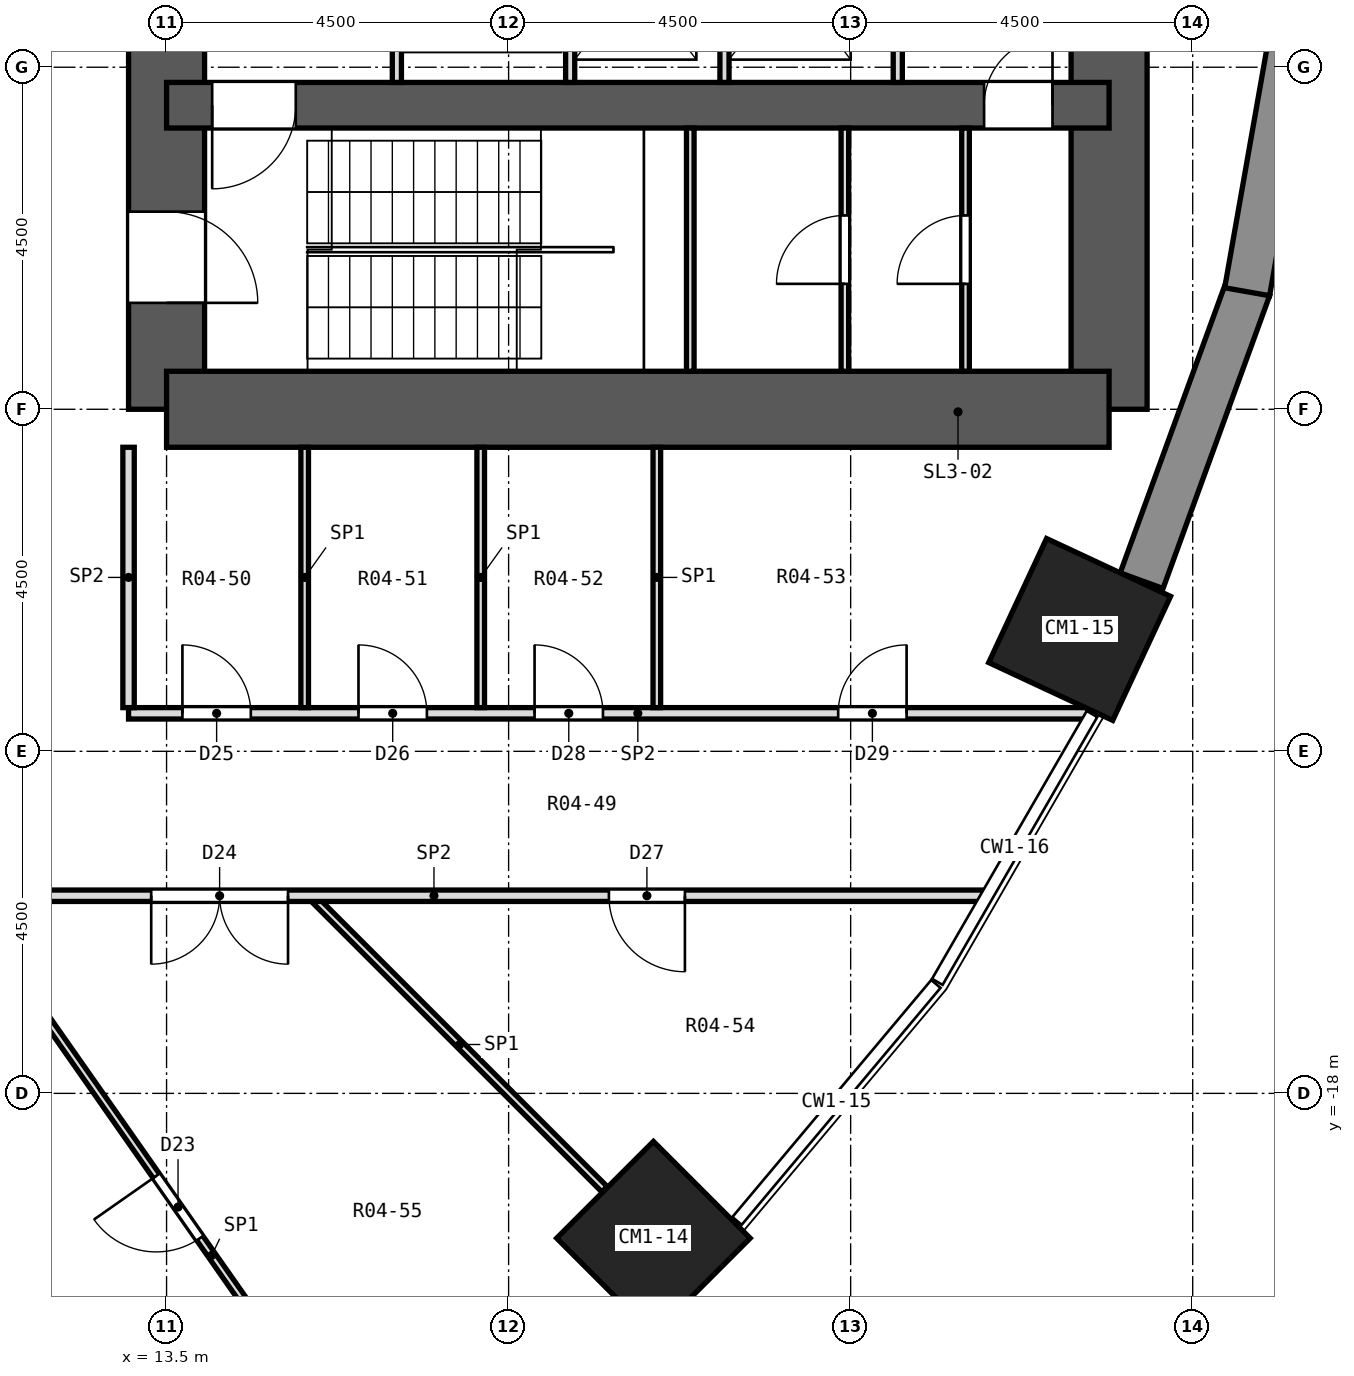
"""IFC4 building model, lengths in metres.
Left out: names, types, materials, properties, quantities, classifications, styles, units other than length and angle.
Written with IfcOpenShell. Run it as: python <this file> out.ifc"""

import sys

from ifc_helpers import new_model, si_unit, direction, frame, frame_2d, origin, origin_2d, place, context, subcontext, project, spatial, rectangle, extrude, element, fill, save


model = new_model("IFC4")
c1 = context("Model", 3, precision=1e-05, world=origin(), true_north=direction((0.0, 1.0)))
c2 = subcontext(c1, "Body", "Model", "MODEL_VIEW")
j1 = project(units=[si_unit("LENGTHUNIT", "METRE"), si_unit("PLANEANGLEUNIT", "RADIAN")], contexts=[c1])
p1 = place(None, origin())
s1 = spatial("IfcSite", under=j1, at=p1, CompositionType="ELEMENT")
p2 = place(p1, origin())
s2 = spatial("IfcBuilding", under=s1, at=p2, CompositionType="ELEMENT")
p3 = place(p2, frame((0.0, 0.0, 5.0)))
s3 = spatial("IfcBuildingStorey", under=s2, at=p3, CompositionType="ELEMENT", Elevation=5.0)
for number, where, z_axis, x_axis in (
    (1, (19.905, -19.905, 0.0), (0.0, 0.0, 1.0), (0.707, -0.707, 0.0)),
    (2, (25.512, -11.897, 0.0), (0.0, 0.0, 1.0), (0.906, -0.423, 0.0)),
):
    element("IfcColumn", number, at=place(p3, frame(where, z_axis=z_axis, x_axis=x_axis)), inside=s3, PredefinedType="COLUMN", context=c2, shape_type="SweptSolid", body=[
        extrude(rectangle(XDim=1.8, YDim=1.8, at=origin_2d()), origin(), (0.0, 0.0, 1.0), 4.2),
    ])
p4 = place(p3, frame((13.5, -9.0, 0.0), z_axis=(0.0, 0.0, 1.0), x_axis=(0.0, 1.0, 0.0)))
e3 = element("IfcWall", 3, at=p4, inside=s3, PredefinedType="SHEAR", context=c2, shape_type="SweptSolid", body=[
    extrude(rectangle(XDim=18.0, YDim=1.0, at=frame_2d((9.0, 0.0))), origin(), (0.0, 0.0, 1.0), 4.2),
])
p5 = place(p4, frame((15.4, 0.0, 0.0)))
e4 = element("IfcOpeningElement", 4, at=p5, cuts=e3, PredefinedType="OPENING", context=c2, shape_type="SweptSolid", body=[
    extrude(rectangle(XDim=1.2, YDim=2.1, at=frame_2d((0.6, 1.05))), frame((0.0, 0.512, 0.0), z_axis=(0.0, -1.0, 0.0), x_axis=(1.0, 0.0, 0.0)), (0.0, 0.0, 1.0), 1.024),
])
p6 = place(p4, frame((1.4, 0.0, 0.0)))
e5 = element("IfcOpeningElement", 5, at=p6, cuts=e3, PredefinedType="OPENING", context=c2, shape_type="SweptSolid", body=[
    extrude(rectangle(XDim=1.2, YDim=2.1, at=frame_2d((0.6, 1.05))), frame((0.0, 0.512, 0.0), z_axis=(0.0, -1.0, 0.0), x_axis=(1.0, 0.0, 0.0)), (0.0, 0.0, 1.0), 1.024),
])
p7 = place(p4, frame((7.5, 0.0, 0.0)))
e6 = element("IfcOpeningElement", 6, at=p7, cuts=e3, PredefinedType="OPENING", context=c2, shape_type="SweptSolid", body=[
    extrude(rectangle(XDim=3.0, YDim=2.4, at=frame_2d((1.5, 1.2))), frame((0.0, 0.512, 0.0), z_axis=(0.0, -1.0, 0.0), x_axis=(1.0, 0.0, 0.0)), (0.0, 0.0, 1.0), 1.024),
])
p8 = place(p3, frame((25.9, -9.0, 0.0), z_axis=(0.0, 0.0, 1.0), x_axis=(0.0, 1.0, 0.0)))
e7 = element("IfcWall", 7, at=p8, inside=s3, PredefinedType="SHEAR", context=c2, shape_type="SweptSolid", body=[
    extrude(rectangle(XDim=18.0, YDim=1.0, at=frame_2d((9.0, 0.0))), origin(), (0.0, 0.0, 1.0), 4.2),
])
p9 = place(p3, frame((13.5, -9.0, 0.0), z_axis=(0.0, 0.0, 1.0), x_axis=(1.0, 0.0, 0.0)))
e8 = element("IfcWall", 8, at=p9, inside=s3, PredefinedType="SHEAR", context=c2, shape_type="SweptSolid", body=[
    extrude(rectangle(XDim=12.4, YDim=1.0, at=frame_2d((6.2, 0.0))), origin(), (0.0, 0.0, 1.0), 4.2),
])
p10 = place(p3, frame((13.5, -5.0, 0.0), z_axis=(0.0, 0.0, 1.0), x_axis=(1.0, 0.0, 0.0)))
e9 = element("IfcWall", 9, at=p10, inside=s3, PredefinedType="SHEAR", context=c2, shape_type="SweptSolid", body=[
    extrude(rectangle(XDim=12.4, YDim=0.6, at=frame_2d((6.2, 0.0))), origin(), (0.0, 0.0, 1.0), 4.2),
])
p11 = place(p10, frame((10.756, 0.0, 0.0)))
e10 = element("IfcOpeningElement", 10, at=p11, cuts=e9, PredefinedType="OPENING", context=c2, shape_type="SweptSolid", body=[
    extrude(rectangle(XDim=0.9, YDim=2.1, at=frame_2d((0.45, 1.05))), frame((0.0, 0.312, 0.0), z_axis=(0.0, -1.0, 0.0), x_axis=(1.0, 0.0, 0.0)), (0.0, 0.0, 1.0), 0.624),
])
p12 = place(p10, frame((0.6, 0.0, 0.0)))
e11 = element("IfcOpeningElement", 11, at=p12, cuts=e9, PredefinedType="OPENING", context=c2, shape_type="SweptSolid", body=[
    extrude(rectangle(XDim=1.1, YDim=2.1, at=frame_2d((0.55, 1.05))), frame((0.0, 0.312, 0.0), z_axis=(0.0, -1.0, 0.0), x_axis=(1.0, 0.0, 0.0)), (0.0, 0.0, 1.0), 0.624),
])
p13 = place(p3, frame((26.328, -11.255, 0.0), z_axis=(0.0, 0.0, 1.0), x_axis=(0.342034744565, 0.939687306241, 0.0)))
e12 = element("IfcWall", 12, at=p13, inside=s3, PredefinedType="SOLIDWALL", context=c2, shape_type="SweptSolid", body=[
    extrude(rectangle(XDim=4.099, YDim=0.6, at=frame_2d((2.05, 0.0))), origin(), (0.0, 0.0, 1.0), 3.65),
])
p14 = place(p3, frame((27.716, -7.454, 0.0), z_axis=(0.0, 0.0, 1.0), x_axis=(0.173673210505, 0.984803338719, 0.0)))
e13 = element("IfcWall", 13, at=p14, inside=s3, PredefinedType="SOLIDWALL", context=c2, shape_type="SweptSolid", body=[
    extrude(rectangle(XDim=4.099, YDim=0.6, at=frame_2d((2.05, 0.0))), origin(), (0.0, 0.0, 1.0), 3.65),
])
p15 = place(p3, frame((10.826, -15.461, 0.0), z_axis=(0.0, 0.0, 1.0), x_axis=(0.573622474099, -0.819119806383, 0.0)))
e14 = element("IfcWall", 14, at=p15, inside=s3, PredefinedType="PARTITIONING", context=c2, shape_type="SweptSolid", body=[
    extrude(rectangle(XDim=9.925, YDim=0.1, at=frame_2d((4.962, 0.0))), origin(), (0.0, 0.0, 1.0), 3.65),
])
p16 = place(p15, frame((4.425, 0.0, 0.0)))
e15 = element("IfcOpeningElement", 15, at=p16, cuts=e14, PredefinedType="OPENING", context=c2, shape_type="SweptSolid", body=[
    extrude(rectangle(XDim=1.0, YDim=2.1, at=frame_2d((0.5, 1.05))), frame((0.0, 0.062, 0.0), z_axis=(0.0, -1.0, 0.0), x_axis=(1.0, 0.0, 0.0)), (0.0, 0.0, 1.0), 0.124),
])
p17 = place(p3, frame((15.453, -15.453, 0.0), z_axis=(0.0, 0.0, 1.0), x_axis=(0.707220086868, -0.706993457346, 0.0)))
e16 = element("IfcWall", 16, at=p17, inside=s3, PredefinedType="PARTITIONING", context=c2, shape_type="SweptSolid", body=[
    extrude(rectangle(XDim=5.386, YDim=0.1, at=frame_2d((2.693, 0.0))), origin(), (0.0, 0.0, 1.0), 3.65),
])
p18 = place(p3, frame((9.8, -15.4, 0.0), z_axis=(0.0, 0.0, 1.0), x_axis=(1.0, 0.0, 0.0)))
e17 = element("IfcWall", 17, at=p18, inside=s3, PredefinedType="PARTITIONING", context=c2, shape_type="SweptSolid", body=[
    extrude(rectangle(XDim=14.437, YDim=0.15, at=frame_2d((7.219, 0.0))), origin(), (0.0, 0.0, 1.0), 3.65),
])
p19 = place(p18, frame((3.498, 0.0, 0.0)))
e18 = element("IfcOpeningElement", 18, at=p19, cuts=e17, PredefinedType="OPENING", context=c2, shape_type="SweptSolid", body=[
    extrude(rectangle(XDim=1.8, YDim=2.1, at=frame_2d((0.9, 1.05))), frame((0.0, 0.087, 0.0), z_axis=(0.0, -1.0, 0.0), x_axis=(1.0, 0.0, 0.0)), (0.0, 0.0, 1.0), 0.174),
])
p20 = place(p18, frame((9.52, 0.0, 0.0)))
e19 = element("IfcOpeningElement", 19, at=p20, cuts=e17, PredefinedType="OPENING", context=c2, shape_type="SweptSolid", body=[
    extrude(rectangle(XDim=1.0, YDim=2.1, at=frame_2d((0.5, 1.05))), frame((0.0, 0.087, 0.0), z_axis=(0.0, -1.0, 0.0), x_axis=(1.0, 0.0, 0.0)), (0.0, 0.0, 1.0), 0.174),
])
p21 = place(p3, frame((13.0, -13.0, 0.0), z_axis=(0.0, 0.0, 1.0), x_axis=(1.0, 0.0, 0.0)))
e20 = element("IfcWall", 20, at=p21, inside=s3, PredefinedType="PARTITIONING", context=c2, shape_type="SweptSolid", body=[
    extrude(rectangle(XDim=12.622, YDim=0.15, at=frame_2d((6.311, 0.0))), origin(), (0.0, 0.0, 1.0), 3.65),
])
p22 = place(p21, frame((0.708, 0.0, 0.0)))
e21 = element("IfcOpeningElement", 21, at=p22, cuts=e20, PredefinedType="OPENING", context=c2, shape_type="SweptSolid", body=[
    extrude(rectangle(XDim=0.9, YDim=2.1, at=frame_2d((0.45, 1.05))), frame((0.0, 0.087, 0.0), z_axis=(0.0, -1.0, 0.0), x_axis=(1.0, 0.0, 0.0)), (0.0, 0.0, 1.0), 0.174),
])
p23 = place(p21, frame((3.025, 0.0, 0.0)))
e22 = element("IfcOpeningElement", 22, at=p23, cuts=e20, PredefinedType="OPENING", context=c2, shape_type="SweptSolid", body=[
    extrude(rectangle(XDim=0.9, YDim=2.1, at=frame_2d((0.45, 1.05))), frame((0.0, 0.087, 0.0), z_axis=(0.0, -1.0, 0.0), x_axis=(1.0, 0.0, 0.0)), (0.0, 0.0, 1.0), 0.174),
])
p24 = place(p21, frame((5.342, 0.0, 0.0)))
e23 = element("IfcOpeningElement", 23, at=p24, cuts=e20, PredefinedType="OPENING", context=c2, shape_type="SweptSolid", body=[
    extrude(rectangle(XDim=0.9, YDim=2.1, at=frame_2d((0.45, 1.05))), frame((0.0, 0.087, 0.0), z_axis=(0.0, -1.0, 0.0), x_axis=(1.0, 0.0, 0.0)), (0.0, 0.0, 1.0), 0.174),
])
p25 = place(p21, frame((9.336, 0.0, 0.0)))
e24 = element("IfcOpeningElement", 24, at=p25, cuts=e20, PredefinedType="OPENING", context=c2, shape_type="SweptSolid", body=[
    extrude(rectangle(XDim=0.9, YDim=2.1, at=frame_2d((0.45, 1.05))), frame((0.0, 0.087, 0.0), z_axis=(0.0, -1.0, 0.0), x_axis=(1.0, 0.0, 0.0)), (0.0, 0.0, 1.0), 0.174),
])
for number, where, z_axis, x_axis in (
    (25, (19.95, -12.925, 0.0), (0.0, 0.0, 1.0), (0.0, 1.0, 0.0)),
    (26, (17.633, -12.925, 0.0), (0.0, 0.0, 1.0), (0.0, 1.0, 0.0)),
    (27, (15.317, -12.925, 0.0), (0.0, 0.0, 1.0), (0.0, 1.0, 0.0)),
):
    element("IfcWall", number, at=place(p3, frame(where, z_axis=z_axis, x_axis=x_axis)), inside=s3, PredefinedType="PARTITIONING", context=c2, shape_type="SweptSolid", body=[
        extrude(rectangle(XDim=3.425, YDim=0.1, at=frame_2d((1.712, 0.0))), origin(), (0.0, 0.0, 1.0), 3.65),
    ])
p26 = place(p3, frame((13.0, -12.925, 0.0), z_axis=(0.0, 0.0, 1.0), x_axis=(0.0, 1.0, 0.0)))
e28 = element("IfcWall", 28, at=p26, inside=s3, PredefinedType="PARTITIONING", context=c2, shape_type="SweptSolid", body=[
    extrude(rectangle(XDim=3.425, YDim=0.15, at=frame_2d((1.712, 0.0))), origin(), (0.0, 0.0, 1.0), 3.65),
])
p27 = place(p3, frame((16.53, -4.7, 0.0), z_axis=(0.0, 0.0, 1.0), x_axis=(0.0, 1.0, 0.0)))
e29 = element("IfcWall", 29, at=p27, inside=s3, PredefinedType="PARTITIONING", context=c2, shape_type="SweptSolid", body=[
    extrude(rectangle(XDim=2.4, YDim=0.12, at=frame_2d((1.2, 0.0))), origin(), (0.0, 0.0, 1.0), 3.65),
])
p28 = place(p27, frame((0.65, 0.0, 0.0)))
e30 = element("IfcOpeningElement", 30, at=p28, cuts=e29, PredefinedType="OPENING", context=c2, shape_type="SweptSolid", body=[
    extrude(rectangle(XDim=1.1, YDim=2.1, at=frame_2d((0.55, 1.05))), frame((0.0, 0.072, 0.0), z_axis=(0.0, -1.0, 0.0), x_axis=(1.0, 0.0, 0.0)), (0.0, 0.0, 1.0), 0.144),
])
for number, where, z_axis, x_axis in (
    (31, (18.81, -4.7, 0.0), (0.0, 0.0, 1.0), (0.0, 1.0, 0.0)),
    (32, (20.84, -4.7, 0.0), (0.0, 0.0, 1.0), (0.0, 1.0, 0.0)),
    (33, (23.12, -4.7, 0.0), (0.0, 0.0, 1.0), (0.0, 1.0, 0.0)),
):
    element("IfcWall", number, at=place(p3, frame(where, z_axis=z_axis, x_axis=x_axis)), inside=s3, PredefinedType="PARTITIONING", context=c2, shape_type="SweptSolid", body=[
        extrude(rectangle(XDim=2.4, YDim=0.12, at=frame_2d((1.2, 0.0))), origin(), (0.0, 0.0, 1.0), 3.65),
    ])
p29 = place(p3, frame((20.39, -8.5, 0.0), z_axis=(0.0, 0.0, 1.0), x_axis=(0.0, 1.0, 0.0)))
e34 = element("IfcWall", 34, at=p29, inside=s3, PredefinedType="PARTITIONING", context=c2, shape_type="SweptSolid", body=[
    extrude(rectangle(XDim=3.2, YDim=0.1, at=frame_2d((1.6, 0.0))), origin(), (0.0, 0.0, 1.0), 3.65),
])
p30 = place(p3, frame((22.424, -8.5, 0.0), z_axis=(0.0, 0.0, 1.0), x_axis=(0.0, 1.0, 0.0)))
e35 = element("IfcWall", 35, at=p30, inside=s3, PredefinedType="PARTITIONING", context=c2, shape_type="SweptSolid", body=[
    extrude(rectangle(XDim=3.2, YDim=0.1, at=frame_2d((1.6, 0.0))), origin(), (0.0, 0.0, 1.0), 3.65),
])
p31 = place(p30, frame((1.15, 0.0, 0.0)))
e36 = element("IfcOpeningElement", 36, at=p31, cuts=e35, PredefinedType="OPENING", context=c2, shape_type="SweptSolid", body=[
    extrude(rectangle(XDim=0.9, YDim=2.1, at=frame_2d((0.45, 1.05))), frame((0.0, 0.062, 0.0), z_axis=(0.0, -1.0, 0.0), x_axis=(1.0, 0.0, 0.0)), (0.0, 0.0, 1.0), 0.124),
])
p32 = place(p3, frame((24.011, -8.5, 0.0), z_axis=(0.0, 0.0, 1.0), x_axis=(0.0, 1.0, 0.0)))
e37 = element("IfcWall", 37, at=p32, inside=s3, PredefinedType="PARTITIONING", context=c2, shape_type="SweptSolid", body=[
    extrude(rectangle(XDim=3.2, YDim=0.1, at=frame_2d((1.6, 0.0))), origin(), (0.0, 0.0, 1.0), 3.65),
])
p33 = place(p32, frame((1.15, 0.0, 0.0)))
e38 = element("IfcOpeningElement", 38, at=p33, cuts=e37, PredefinedType="OPENING", context=c2, shape_type="SweptSolid", body=[
    extrude(rectangle(XDim=0.9, YDim=2.1, at=frame_2d((0.45, 1.05))), frame((0.0, 0.062, 0.0), z_axis=(0.0, -1.0, 0.0), x_axis=(1.0, 0.0, 0.0)), (0.0, 0.0, 1.0), 0.124),
])
p34 = place(p16, frame((1.0, 0.0, 0.0), z_axis=(0.0, 0.0, 1.0), x_axis=(-1.0, 0.0, 0.0)))
e39 = element("IfcDoor", 39, at=p34, inside=s3, OperationType="SINGLE_SWING_RIGHT", PredefinedType="DOOR", context=c2, shape_type="SweptSolid", body=[
    extrude(rectangle(XDim=1.0, YDim=2.1, at=frame_2d((0.5, 1.05))), frame((0.0, 0.025, 0.0), z_axis=(0.0, -1.0, 0.0), x_axis=(1.0, 0.0, 0.0)), (0.0, 0.0, 1.0), 0.05),
])
fill(e15, e39)
p35 = place(p19, frame((1.8, 0.0, 0.0), z_axis=(0.0, 0.0, 1.0), x_axis=(-1.0, 0.0, 0.0)))
e40 = element("IfcDoor", 40, at=p35, inside=s3, OperationType="DOUBLE_DOOR_SINGLE_SWING", PredefinedType="DOOR", context=c2, shape_type="SweptSolid", body=[
    extrude(rectangle(XDim=1.8, YDim=2.1, at=frame_2d((0.9, 1.05))), frame((0.0, 0.025, 0.0), z_axis=(0.0, -1.0, 0.0), x_axis=(1.0, 0.0, 0.0)), (0.0, 0.0, 1.0), 0.05),
])
fill(e18, e40)
p36 = place(p22, origin())
e41 = element("IfcDoor", 41, at=p36, inside=s3, OperationType="SINGLE_SWING_LEFT", PredefinedType="DOOR", context=c2, shape_type="SweptSolid", body=[
    extrude(rectangle(XDim=0.9, YDim=2.1, at=frame_2d((0.45, 1.05))), frame((0.0, 0.025, 0.0), z_axis=(0.0, -1.0, 0.0), x_axis=(1.0, 0.0, 0.0)), (0.0, 0.0, 1.0), 0.05),
])
fill(e21, e41)
p37 = place(p23, origin())
e42 = element("IfcDoor", 42, at=p37, inside=s3, OperationType="SINGLE_SWING_LEFT", PredefinedType="DOOR", context=c2, shape_type="SweptSolid", body=[
    extrude(rectangle(XDim=0.9, YDim=2.1, at=frame_2d((0.45, 1.05))), frame((0.0, 0.025, 0.0), z_axis=(0.0, -1.0, 0.0), x_axis=(1.0, 0.0, 0.0)), (0.0, 0.0, 1.0), 0.05),
])
fill(e22, e42)
p38 = place(p20, frame((1.0, 0.0, 0.0), z_axis=(0.0, 0.0, 1.0), x_axis=(-1.0, 0.0, 0.0)))
e43 = element("IfcDoor", 43, at=p38, inside=s3, OperationType="SINGLE_SWING_LEFT", PredefinedType="DOOR", context=c2, shape_type="SweptSolid", body=[
    extrude(rectangle(XDim=1.0, YDim=2.1, at=frame_2d((0.5, 1.05))), frame((0.0, 0.025, 0.0), z_axis=(0.0, -1.0, 0.0), x_axis=(1.0, 0.0, 0.0)), (0.0, 0.0, 1.0), 0.05),
])
fill(e19, e43)
p39 = place(p24, origin())
e44 = element("IfcDoor", 44, at=p39, inside=s3, OperationType="SINGLE_SWING_LEFT", PredefinedType="DOOR", context=c2, shape_type="SweptSolid", body=[
    extrude(rectangle(XDim=0.9, YDim=2.1, at=frame_2d((0.45, 1.05))), frame((0.0, 0.025, 0.0), z_axis=(0.0, -1.0, 0.0), x_axis=(1.0, 0.0, 0.0)), (0.0, 0.0, 1.0), 0.05),
])
fill(e23, e44)
p40 = place(p25, origin())
e45 = element("IfcDoor", 45, at=p40, inside=s3, OperationType="SINGLE_SWING_RIGHT", PredefinedType="DOOR", context=c2, shape_type="SweptSolid", body=[
    extrude(rectangle(XDim=0.9, YDim=2.1, at=frame_2d((0.45, 1.05))), frame((0.0, 0.025, 0.0), z_axis=(0.0, -1.0, 0.0), x_axis=(1.0, 0.0, 0.0)), (0.0, 0.0, 1.0), 0.05),
])
fill(e24, e45)
p41 = place(p33, origin())
e46 = element("IfcDoor", 46, at=p41, inside=s3, OperationType="SINGLE_SWING_LEFT", PredefinedType="DOOR", context=c2, shape_type="SweptSolid", body=[
    extrude(rectangle(XDim=0.9, YDim=2.1, at=frame_2d((0.45, 1.05))), frame((0.0, 0.025, 0.0), z_axis=(0.0, -1.0, 0.0), x_axis=(1.0, 0.0, 0.0)), (0.0, 0.0, 1.0), 0.05),
])
fill(e38, e46)
p42 = place(p31, origin())
e47 = element("IfcDoor", 47, at=p42, inside=s3, OperationType="SINGLE_SWING_LEFT", PredefinedType="DOOR", context=c2, shape_type="SweptSolid", body=[
    extrude(rectangle(XDim=0.9, YDim=2.1, at=frame_2d((0.45, 1.05))), frame((0.0, 0.025, 0.0), z_axis=(0.0, -1.0, 0.0), x_axis=(1.0, 0.0, 0.0)), (0.0, 0.0, 1.0), 0.05),
])
fill(e36, e47)
p43 = place(p11, origin())
e48 = element("IfcDoor", 48, at=p43, inside=s3, OperationType="SINGLE_SWING_RIGHT", PredefinedType="DOOR", context=c2, shape_type="SweptSolid", body=[
    extrude(rectangle(XDim=0.9, YDim=2.1, at=frame_2d((0.45, 1.05))), frame((0.0, 0.025, 0.0), z_axis=(0.0, -1.0, 0.0), x_axis=(1.0, 0.0, 0.0)), (0.0, 0.0, 1.0), 0.05),
])
fill(e10, e48)
p44 = place(p12, frame((1.1, 0.0, 0.0), z_axis=(0.0, 0.0, 1.0), x_axis=(-1.0, 0.0, 0.0)))
e49 = element("IfcDoor", 49, at=p44, inside=s3, OperationType="SINGLE_SWING_RIGHT", PredefinedType="DOOR", context=c2, shape_type="SweptSolid", body=[
    extrude(rectangle(XDim=1.1, YDim=2.1, at=frame_2d((0.55, 1.05))), frame((0.0, 0.025, 0.0), z_axis=(0.0, -1.0, 0.0), x_axis=(1.0, 0.0, 0.0)), (0.0, 0.0, 1.0), 0.05),
])
fill(e11, e49)
p45 = place(p6, frame((1.2, 0.0, 0.0), z_axis=(0.0, 0.0, 1.0), x_axis=(-1.0, 0.0, 0.0)))
e50 = element("IfcDoor", 50, at=p45, inside=s3, OperationType="SINGLE_SWING_RIGHT", PredefinedType="DOOR", context=c2, shape_type="SweptSolid", body=[
    extrude(rectangle(XDim=1.2, YDim=2.1, at=frame_2d((0.6, 1.05))), frame((0.0, 0.025, 0.0), z_axis=(0.0, -1.0, 0.0), x_axis=(1.0, 0.0, 0.0)), (0.0, 0.0, 1.0), 0.05),
])
fill(e5, e50)
save(model, sys.argv[1])
